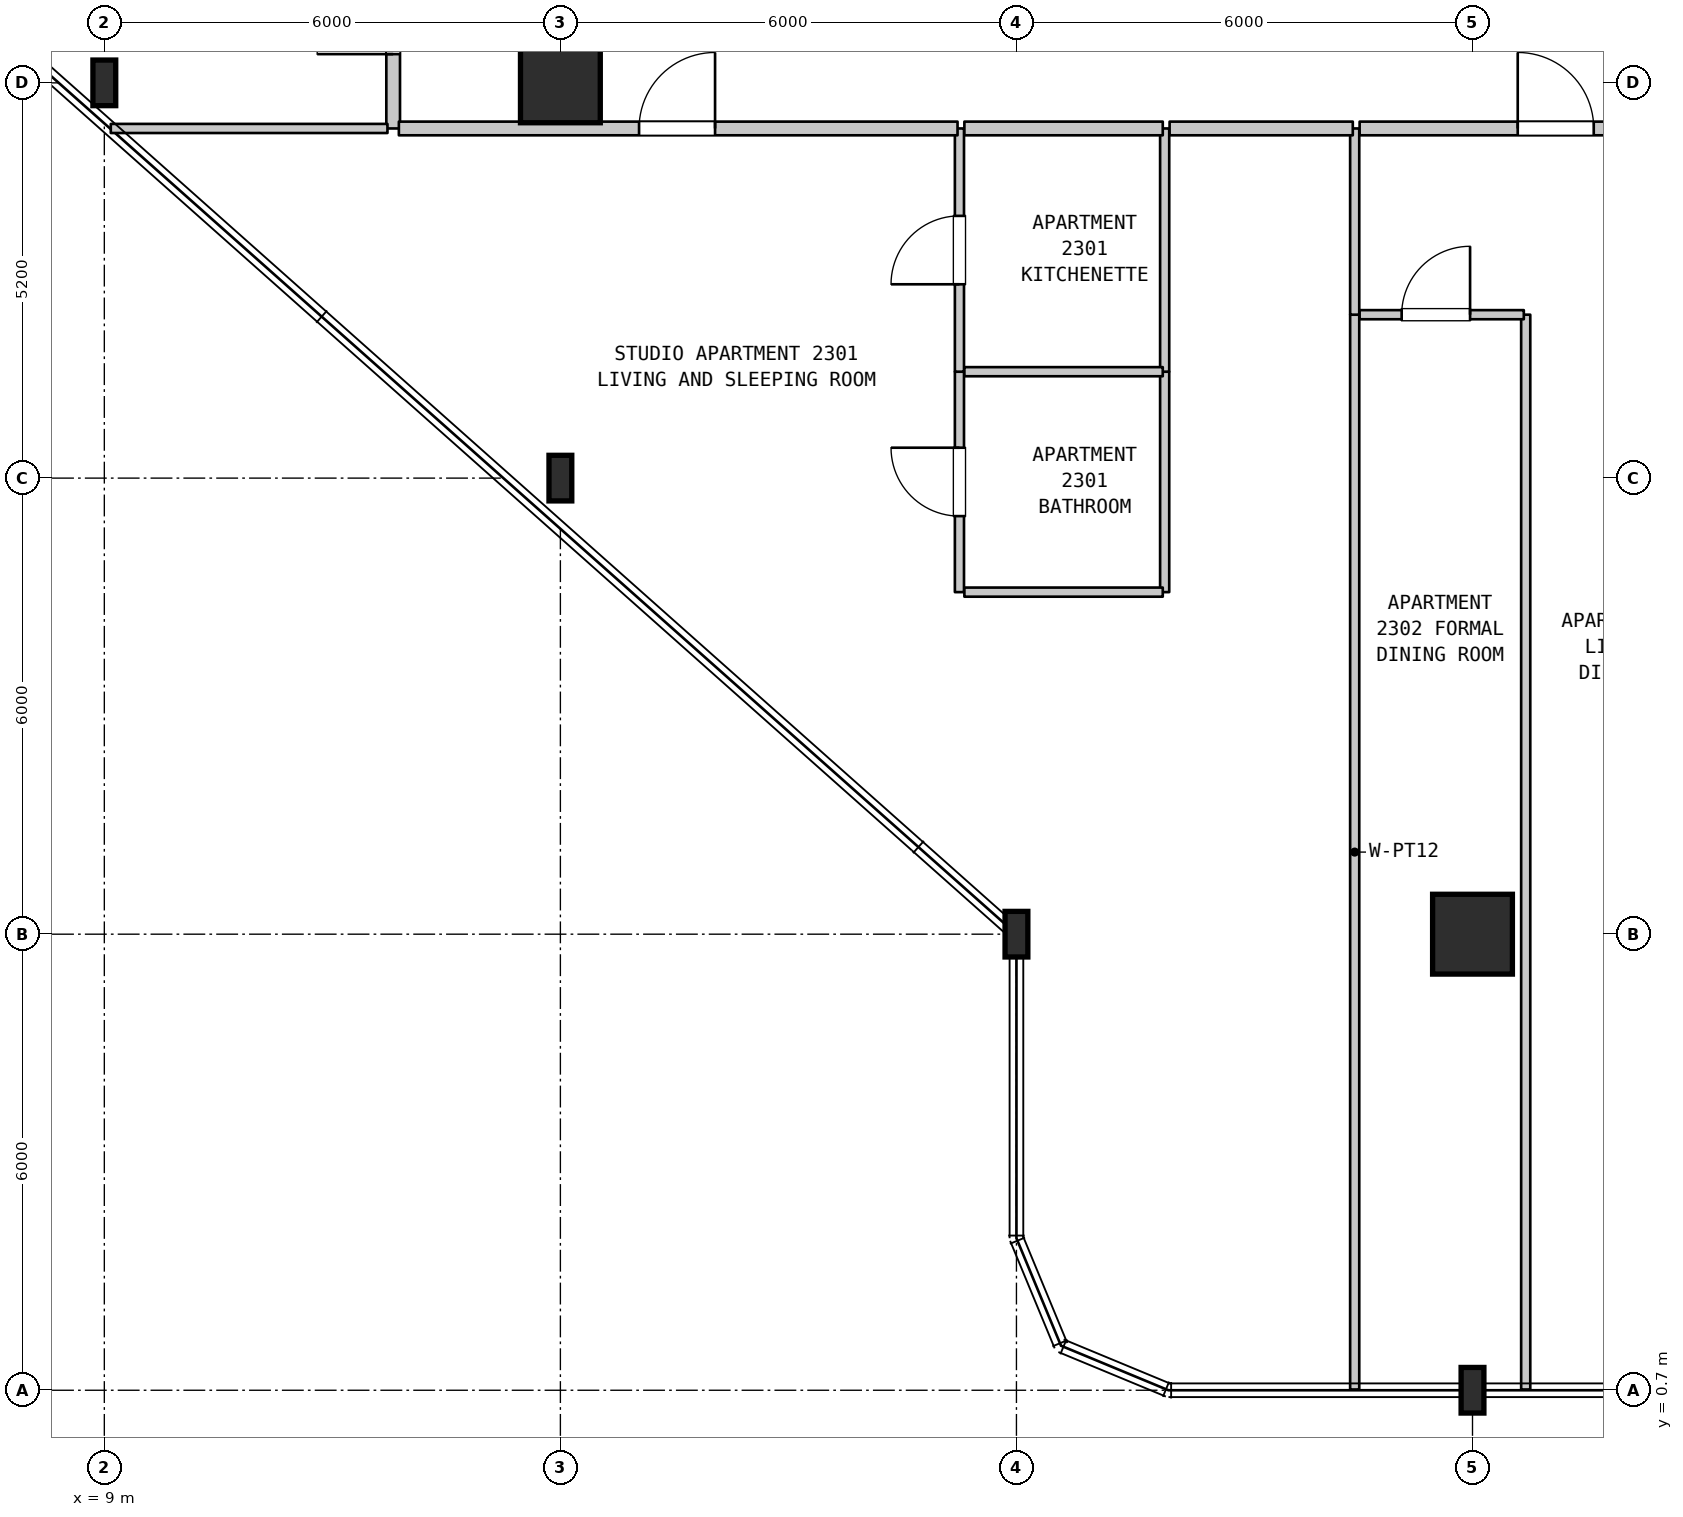
"""IFC4 building model, lengths in metres.
Left out: names, types, materials, properties, quantities, classifications, styles, units other than length and angle.
Written with IfcOpenShell. Run it as: python <this file> out.ifc"""

import sys

from ifc_helpers import new_model, si_unit, direction, frame, frame_2d, origin, origin_2d, place, context, subcontext, project, spatial, rectangle, i_section, extrude, element, fill, save


model = new_model("IFC4")
c1 = context("Model", 3, precision=1e-05, world=origin(), true_north=direction((0.0, 1.0)))
c2 = subcontext(c1, "Body", "Model", "MODEL_VIEW")
j1 = project(units=[si_unit("LENGTHUNIT", "METRE"), si_unit("PLANEANGLEUNIT", "RADIAN")], contexts=[c1])
p1 = place(None, origin())
s1 = spatial("IfcSite", under=j1, at=p1, CompositionType="ELEMENT")
p2 = place(p1, origin())
s2 = spatial("IfcBuilding", under=s1, at=p2, CompositionType="ELEMENT")
p3 = place(p2, frame((0.0, 0.0, 98.3)))
s3 = spatial("IfcBuildingStorey", under=s2, at=p3, CompositionType="ELEMENT", Elevation=98.3)
for number, where, z_axis, x_axis in (
    (1, (9.0, 17.9, 0.0), (0.0, 0.0, 1.0), (1.0, 0.0, 0.0)),
    (2, (15.0, 12.7, 0.0), (0.0, 0.0, 1.0), (1.0, 0.0, 0.0)),
):
    element("IfcColumn", number, at=place(p3, frame(where, z_axis=z_axis, x_axis=x_axis)), inside=s3, PredefinedType="COLUMN", context=c2, shape_type="SweptSolid", body=[
        extrude(i_section(OverallWidth=0.3, OverallDepth=0.6, WebThickness=0.015, FlangeThickness=0.03, FilletRadius=0.027, at=origin_2d()), origin(), (0.0, 0.0, 1.0), 3.7),
    ])
p4 = place(p3, frame((15.0, 17.9, 0.0), z_axis=(0.0, 0.0, 1.0), x_axis=(1.0, 0.0, 0.0)))
e3 = element("IfcColumn", 3, at=p4, inside=s3, PredefinedType="COLUMN", context=c2, shape_type="SweptSolid", body=[
    extrude(rectangle(XDim=1.05, YDim=1.05, at=origin_2d()), origin(), (0.0, 0.0, 1.0), 3.7),
])
for number, where, z_axis, x_axis in (
    (4, (21.0, 6.7, 0.0), (0.0, 0.0, 1.0), (1.0, 0.0, 0.0)),
    (5, (27.0, 0.7, 0.0), (0.0, 0.0, 1.0), (1.0, 0.0, 0.0)),
):
    element("IfcColumn", number, at=place(p3, frame(where, z_axis=z_axis, x_axis=x_axis)), inside=s3, PredefinedType="COLUMN", context=c2, shape_type="SweptSolid", body=[
        extrude(i_section(OverallWidth=0.3, OverallDepth=0.6, WebThickness=0.015, FlangeThickness=0.03, FilletRadius=0.027, at=origin_2d()), origin(), (0.0, 0.0, 1.0), 3.7),
    ])
p5 = place(p3, frame((27.0, 6.7, 0.0), z_axis=(0.0, 0.0, 1.0), x_axis=(1.0, 0.0, 0.0)))
e6 = element("IfcColumn", 6, at=p5, inside=s3, PredefinedType="COLUMN", context=c2, shape_type="SweptSolid", body=[
    extrude(rectangle(XDim=1.05, YDim=1.05, at=origin_2d()), origin(), (0.0, 0.0, 1.0), 3.7),
])
p6 = place(p3, frame((12.8, 17.3, 0.0), z_axis=(0.0, 0.0, 1.0), x_axis=(0.0, 1.0, 0.0)))
e7 = element("IfcWall", 7, at=p6, inside=s3, PredefinedType="STANDARD", context=c2, shape_type="SweptSolid", body=[
    extrude(rectangle(XDim=3.1, YDim=0.18, at=frame_2d((1.55, 0.0))), origin(), (0.0, 0.0, 1.0), 3.385),
])
p7 = place(p6, frame((0.978, 0.0, 0.0)))
e8 = element("IfcOpeningElement", 8, at=p7, cuts=e7, PredefinedType="OPENING", context=c2, shape_type="SweptSolid", body=[
    extrude(rectangle(XDim=1.0, YDim=2.15, at=frame_2d((0.5, 1.075))), frame((0.0, 0.1, 0.0), z_axis=(0.0, -1.0, 0.0), x_axis=(1.0, 0.0, 0.0)), (0.0, 0.0, 1.0), 0.2),
])
p8 = place(p3, frame((20.25, 11.2, 0.0), z_axis=(0.0, 0.0, 1.0), x_axis=(0.0, 1.0, 0.0)))
e9 = element("IfcWall", 9, at=p8, inside=s3, PredefinedType="PARTITIONING", context=c2, shape_type="SweptSolid", body=[
    extrude(rectangle(XDim=2.9, YDim=0.12, at=frame_2d((1.45, 0.0))), origin(), (0.0, 0.0, 1.0), 3.385),
])
p9 = place(p8, frame((1.0, 0.0, 0.0)))
e10 = element("IfcOpeningElement", 10, at=p9, cuts=e9, PredefinedType="OPENING", context=c2, shape_type="SweptSolid", body=[
    extrude(rectangle(XDim=0.9, YDim=2.1, at=frame_2d((0.45, 1.05))), frame((0.0, 0.07, 0.0), z_axis=(0.0, -1.0, 0.0), x_axis=(1.0, 0.0, 0.0)), (0.0, 0.0, 1.0), 0.14),
])
p10 = place(p3, frame((20.25, 14.1, 0.0), z_axis=(0.0, 0.0, 1.0), x_axis=(0.0, 1.0, 0.0)))
e11 = element("IfcWall", 11, at=p10, inside=s3, PredefinedType="PARTITIONING", context=c2, shape_type="SweptSolid", body=[
    extrude(rectangle(XDim=3.2, YDim=0.12, at=frame_2d((1.6, 0.0))), origin(), (0.0, 0.0, 1.0), 3.385),
])
p11 = place(p10, frame((1.15, 0.0, 0.0)))
e12 = element("IfcOpeningElement", 12, at=p11, cuts=e11, PredefinedType="OPENING", context=c2, shape_type="SweptSolid", body=[
    extrude(rectangle(XDim=0.9, YDim=2.15, at=frame_2d((0.45, 1.075))), frame((0.0, 0.07, 0.0), z_axis=(0.0, -1.0, 0.0), x_axis=(1.0, 0.0, 0.0)), (0.0, 0.0, 1.0), 0.14),
])
p12 = place(p3, frame((22.95, 11.2, 0.0), z_axis=(0.0, 0.0, 1.0), x_axis=(0.0, 1.0, 0.0)))
e13 = element("IfcWall", 13, at=p12, inside=s3, PredefinedType="PARTITIONING", context=c2, shape_type="SweptSolid", body=[
    extrude(rectangle(XDim=2.9, YDim=0.12, at=frame_2d((1.45, 0.0))), origin(), (0.0, 0.0, 1.0), 3.385),
])
p13 = place(p3, frame((22.95, 14.1, 0.0), z_axis=(0.0, 0.0, 1.0), x_axis=(0.0, 1.0, 0.0)))
e14 = element("IfcWall", 14, at=p13, inside=s3, PredefinedType="PARTITIONING", context=c2, shape_type="SweptSolid", body=[
    extrude(rectangle(XDim=3.2, YDim=0.12, at=frame_2d((1.6, 0.0))), origin(), (0.0, 0.0, 1.0), 3.385),
])
p14 = place(p3, frame((25.45, 0.71, 0.0), z_axis=(0.0, 0.0, 1.0), x_axis=(0.0, 1.0, 0.0)))
e15 = element("IfcWall", 15, at=p14, inside=s3, PredefinedType="PARTITIONING", context=c2, shape_type="SweptSolid", body=[
    extrude(rectangle(XDim=14.14, YDim=0.12, at=frame_2d((7.07, 0.0))), origin(), (0.0, 0.0, 1.0), 3.385),
])
p15 = place(p3, frame((25.45, 14.85, 0.0), z_axis=(0.0, 0.0, 1.0), x_axis=(0.0, 1.0, 0.0)))
e16 = element("IfcWall", 16, at=p15, inside=s3, PredefinedType="PARTITIONING", context=c2, shape_type="SweptSolid", body=[
    extrude(rectangle(XDim=2.45, YDim=0.12, at=frame_2d((1.225, 0.0))), origin(), (0.0, 0.0, 1.0), 3.385),
])
p16 = place(p3, frame((27.7, 0.71, 0.0), z_axis=(0.0, 0.0, 1.0), x_axis=(0.0, 1.0, 0.0)))
e17 = element("IfcWall", 17, at=p16, inside=s3, PredefinedType="PARTITIONING", context=c2, shape_type="SweptSolid", body=[
    extrude(rectangle(XDim=14.14, YDim=0.12, at=frame_2d((7.07, 0.0))), origin(), (0.0, 0.0, 1.0), 3.385),
])
for number, where, z_axis, x_axis in (
    (18, (20.315, 11.2, 0.0), (0.0, 0.0, 1.0), (1.0, 0.0, 0.0)),
    (19, (20.315, 14.1, 0.0), (0.0, 0.0, 1.0), (1.0, 0.0, 0.0)),
):
    element("IfcWall", number, at=place(p3, frame(where, z_axis=z_axis, x_axis=x_axis)), inside=s3, PredefinedType="PARTITIONING", context=c2, shape_type="SweptSolid", body=[
        extrude(rectangle(XDim=2.61, YDim=0.12, at=frame_2d((1.305, 0.0))), origin(), (0.0, 0.0, 1.0), 3.385),
    ])
p17 = place(p3, frame((25.515, 14.85, 0.0), z_axis=(0.0, 0.0, 1.0), x_axis=(1.0, 0.0, 0.0)))
e20 = element("IfcWall", 20, at=p17, inside=s3, PredefinedType="PARTITIONING", context=c2, shape_type="SweptSolid", body=[
    extrude(rectangle(XDim=2.16, YDim=0.12, at=frame_2d((1.08, 0.0))), origin(), (0.0, 0.0, 1.0), 3.385),
])
p18 = place(p17, frame((0.553, 0.0, 0.0)))
e21 = element("IfcOpeningElement", 21, at=p18, cuts=e20, PredefinedType="OPENING", context=c2, shape_type="SweptSolid", body=[
    extrude(rectangle(XDim=0.9, YDim=2.15, at=frame_2d((0.45, 1.075))), frame((0.0, 0.07, 0.0), z_axis=(0.0, -1.0, 0.0), x_axis=(1.0, 0.0, 0.0)), (0.0, 0.0, 1.0), 0.14),
])
p19 = place(p3, frame((9.085, 17.3, 0.0), z_axis=(0.0, 0.0, 1.0), x_axis=(1.0, 0.0, 0.0)))
e22 = element("IfcWall", 22, at=p19, inside=s3, PredefinedType="PARTITIONING", context=c2, shape_type="SweptSolid", body=[
    extrude(rectangle(XDim=3.64, YDim=0.12, at=frame_2d((1.82, 0.0))), origin(), (0.0, 0.0, 1.0), 3.385),
])
p20 = place(p3, frame((12.875, 17.3, 0.0), z_axis=(0.0, 0.0, 1.0), x_axis=(1.0, 0.0, 0.0)))
e23 = element("IfcWall", 23, at=p20, inside=s3, PredefinedType="STANDARD", context=c2, shape_type="SweptSolid", body=[
    extrude(rectangle(XDim=7.35, YDim=0.18, at=frame_2d((3.675, 0.0))), origin(), (0.0, 0.0, 1.0), 3.385),
])
p21 = place(p20, frame((3.16, 0.0, 0.0)))
e24 = element("IfcOpeningElement", 24, at=p21, cuts=e23, PredefinedType="OPENING", context=c2, shape_type="SweptSolid", body=[
    extrude(rectangle(XDim=1.0, YDim=2.15, at=frame_2d((0.5, 1.075))), frame((0.0, 0.1, 0.0), z_axis=(0.0, -1.0, 0.0), x_axis=(1.0, 0.0, 0.0)), (0.0, 0.0, 1.0), 0.2),
])
p22 = place(p3, frame((20.315, 17.3, 0.0), z_axis=(0.0, 0.0, 1.0), x_axis=(1.0, 0.0, 0.0)))
e25 = element("IfcWall", 25, at=p22, inside=s3, PredefinedType="STANDARD", context=c2, shape_type="SweptSolid", body=[
    extrude(rectangle(XDim=2.61, YDim=0.18, at=frame_2d((1.305, 0.0))), origin(), (0.0, 0.0, 1.0), 3.385),
])
p23 = place(p3, frame((23.015, 17.3, 0.0), z_axis=(0.0, 0.0, 1.0), x_axis=(1.0, 0.0, 0.0)))
e26 = element("IfcWall", 26, at=p23, inside=s3, PredefinedType="STANDARD", context=c2, shape_type="SweptSolid", body=[
    extrude(rectangle(XDim=2.41, YDim=0.18, at=frame_2d((1.205, 0.0))), origin(), (0.0, 0.0, 1.0), 3.385),
])
p24 = place(p3, frame((25.515, 17.3, 0.0), z_axis=(0.0, 0.0, 1.0), x_axis=(1.0, 0.0, 0.0)))
e27 = element("IfcWall", 27, at=p24, inside=s3, PredefinedType="STANDARD", context=c2, shape_type="SweptSolid", body=[
    extrude(rectangle(XDim=5.095, YDim=0.18, at=frame_2d((2.548, 0.0))), origin(), (0.0, 0.0, 1.0), 3.385),
])
p25 = place(p24, frame((2.08, 0.0, 0.0)))
e28 = element("IfcOpeningElement", 28, at=p25, cuts=e27, PredefinedType="OPENING", context=c2, shape_type="SweptSolid", body=[
    extrude(rectangle(XDim=1.0, YDim=2.15, at=frame_2d((0.5, 1.075))), frame((0.0, 0.1, 0.0), z_axis=(0.0, -1.0, 0.0), x_axis=(1.0, 0.0, 0.0)), (0.0, 0.0, 1.0), 0.2),
])
p26 = place(p7, origin())
e29 = element("IfcDoor", 29, at=p26, inside=s3, OperationType="SINGLE_SWING_LEFT", PredefinedType="DOOR", context=c2, shape_type="SweptSolid", body=[
    extrude(rectangle(XDim=1.0, YDim=2.15, at=frame_2d((0.5, 1.075))), frame((0.0, 0.025, 0.0), z_axis=(0.0, -1.0, 0.0), x_axis=(1.0, 0.0, 0.0)), (0.0, 0.0, 1.0), 0.05),
])
fill(e8, e29)
p27 = place(p9, origin())
e30 = element("IfcDoor", 30, at=p27, inside=s3, OperationType="SINGLE_SWING_RIGHT", PredefinedType="DOOR", context=c2, shape_type="SweptSolid", body=[
    extrude(rectangle(XDim=0.9, YDim=2.1, at=frame_2d((0.45, 1.05))), frame((0.0, 0.025, 0.0), z_axis=(0.0, -1.0, 0.0), x_axis=(1.0, 0.0, 0.0)), (0.0, 0.0, 1.0), 0.05),
])
fill(e10, e30)
p28 = place(p11, origin())
e31 = element("IfcDoor", 31, at=p28, inside=s3, OperationType="SINGLE_SWING_LEFT", PredefinedType="DOOR", context=c2, shape_type="SweptSolid", body=[
    extrude(rectangle(XDim=0.9, YDim=2.15, at=frame_2d((0.45, 1.075))), frame((0.0, 0.025, 0.0), z_axis=(0.0, -1.0, 0.0), x_axis=(1.0, 0.0, 0.0)), (0.0, 0.0, 1.0), 0.05),
])
fill(e12, e31)
p29 = place(p18, origin())
e32 = element("IfcDoor", 32, at=p29, inside=s3, OperationType="SINGLE_SWING_RIGHT", PredefinedType="DOOR", context=c2, shape_type="SweptSolid", body=[
    extrude(rectangle(XDim=0.9, YDim=2.15, at=frame_2d((0.45, 1.075))), frame((0.0, 0.025, 0.0), z_axis=(0.0, -1.0, 0.0), x_axis=(1.0, 0.0, 0.0)), (0.0, 0.0, 1.0), 0.05),
])
fill(e21, e32)
p30 = place(p21, origin())
e33 = element("IfcDoor", 33, at=p30, inside=s3, OperationType="SINGLE_SWING_RIGHT", PredefinedType="DOOR", context=c2, shape_type="SweptSolid", body=[
    extrude(rectangle(XDim=1.0, YDim=2.15, at=frame_2d((0.5, 1.075))), frame((0.0, 0.025, 0.0), z_axis=(0.0, -1.0, 0.0), x_axis=(1.0, 0.0, 0.0)), (0.0, 0.0, 1.0), 0.05),
])
fill(e24, e33)
p31 = place(p25, origin())
e34 = element("IfcDoor", 34, at=p31, inside=s3, OperationType="SINGLE_SWING_LEFT", PredefinedType="DOOR", context=c2, shape_type="SweptSolid", body=[
    extrude(rectangle(XDim=1.0, YDim=2.15, at=frame_2d((0.5, 1.075))), frame((0.0, 0.025, 0.0), z_axis=(0.0, -1.0, 0.0), x_axis=(1.0, 0.0, 0.0)), (0.0, 0.0, 1.0), 0.05),
])
fill(e28, e34)
save(model, sys.argv[1])
